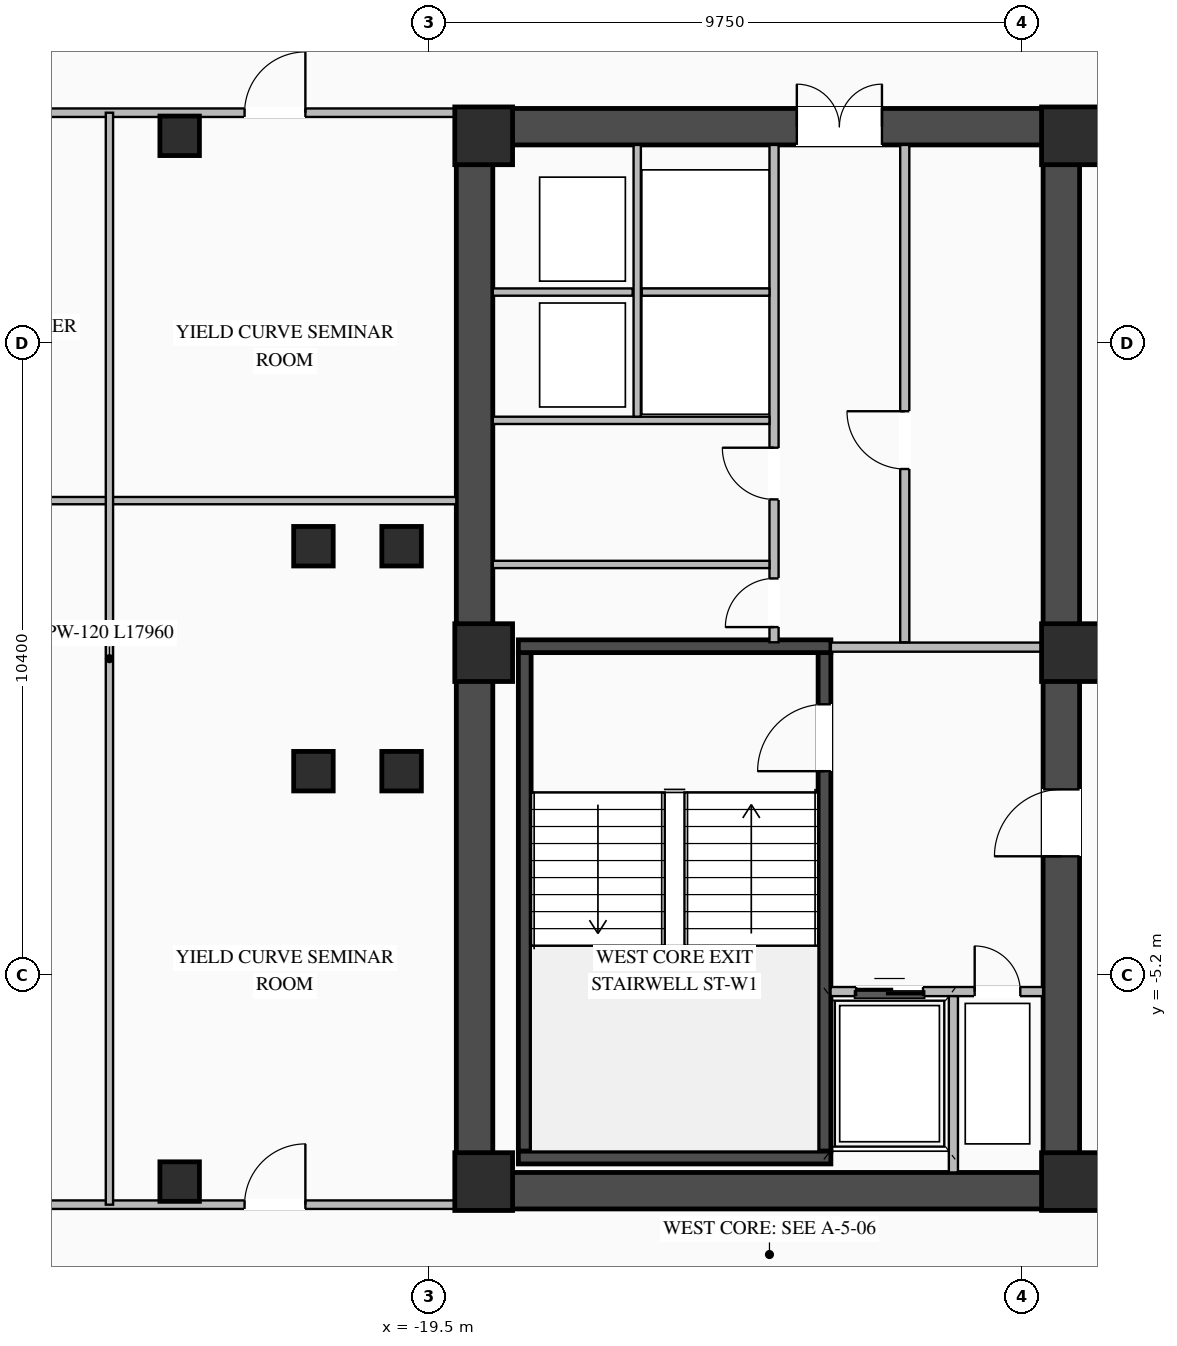
"""IFC4 building model, lengths in metres.
Left out: names, types, materials, properties, quantities, classifications, styles, units other than length and angle.
Written with IfcOpenShell. Run it as: python <this file> out.ifc"""

import sys

from ifc_helpers import new_model, si_unit, direction, frame, frame_2d, origin, origin_2d, place, context, subcontext, project, spatial, rectangle, i_section, extrude, element, fill, save


model = new_model("IFC4")
c1 = context("Model", 3, precision=1e-05, world=origin(), true_north=direction((0.0, 1.0)))
c2 = subcontext(c1, "Body", "Model", "MODEL_VIEW")
j1 = project(units=[si_unit("LENGTHUNIT", "METRE"), si_unit("PLANEANGLEUNIT", "RADIAN")], contexts=[c1])
p1 = place(None, origin())
s1 = spatial("IfcSite", under=j1, at=p1, CompositionType="ELEMENT")
p2 = place(p1, origin())
s2 = spatial("IfcBuilding", under=s1, at=p2, CompositionType="ELEMENT")
p3 = place(p2, frame((0.0, 0.0, 148.45)))
s3 = spatial("IfcBuildingStorey", under=s2, at=p3, CompositionType="ELEMENT", Elevation=148.45)
p4 = place(p3, frame((-19.05, -8.75, 0.0), z_axis=(0.0, 0.0, 1.0), x_axis=(1.0, 0.0, 0.0)))
e1 = element("IfcWall", 1, at=p4, inside=s3, PredefinedType="SHEAR", context=c2, shape_type="SweptSolid", body=[
    extrude(rectangle(XDim=10.25, YDim=0.6, at=frame_2d((5.125, 0.0))), origin(), (0.0, 0.0, 1.0), 3.27),
])
p5 = place(p3, frame((-19.05, 8.75, 0.0), z_axis=(0.0, 0.0, 1.0), x_axis=(1.0, 0.0, 0.0)))
e2 = element("IfcWall", 2, at=p5, inside=s3, PredefinedType="SHEAR", context=c2, shape_type="SweptSolid", body=[
    extrude(rectangle(XDim=10.25, YDim=0.6, at=frame_2d((5.125, 0.0))), origin(), (0.0, 0.0, 1.0), 3.27),
])
p6 = place(p5, frame((5.6, 0.0, 0.0)))
e3 = element("IfcOpeningElement", 3, at=p6, cuts=e2, PredefinedType="OPENING", context=c2, shape_type="SweptSolid", body=[
    extrude(rectangle(XDim=1.4, YDim=2.05, at=frame_2d((0.7, 1.025))), frame((0.0, 0.31, 0.0), z_axis=(0.0, -1.0, 0.0), x_axis=(1.0, 0.0, 0.0)), (0.0, 0.0, 1.0), 0.62),
])
p7 = place(p3, frame((-18.75, -8.45, 0.0), z_axis=(0.0, 0.0, 1.0), x_axis=(0.0, 1.0, 0.0)))
e4 = element("IfcWall", 4, at=p7, inside=s3, PredefinedType="SHEAR", context=c2, shape_type="SweptSolid", body=[
    extrude(rectangle(XDim=16.9, YDim=0.6, at=frame_2d((8.45, 0.0))), origin(), (0.0, 0.0, 1.0), 3.27),
])
p8 = place(p3, frame((-9.1, -8.45, 0.0), z_axis=(0.0, 0.0, 1.0), x_axis=(0.0, 1.0, 0.0)))
e5 = element("IfcWall", 5, at=p8, inside=s3, PredefinedType="SHEAR", context=c2, shape_type="SweptSolid", body=[
    extrude(rectangle(XDim=16.9, YDim=0.6, at=frame_2d((8.45, 0.0))), origin(), (0.0, 0.0, 1.0), 3.27),
])
p9 = place(p8, frame((5.2, 0.0, 0.0)))
e6 = element("IfcOpeningElement", 6, at=p9, cuts=e5, PredefinedType="OPENING", context=c2, shape_type="SweptSolid", body=[
    extrude(rectangle(XDim=1.1, YDim=2.08, at=frame_2d((0.55, 1.04))), frame((0.0, 0.31, 0.0), z_axis=(0.0, -1.0, 0.0), x_axis=(1.0, 0.0, 0.0)), (0.0, 0.0, 1.0), 0.62),
])
p10 = place(p3, frame((-12.995, -8.1, 0.0), z_axis=(0.0, 0.0, 1.0), x_axis=(0.0, 1.0, 0.0)))
e7 = element("IfcWall", 7, at=p10, inside=s3, PredefinedType="SHEAR", context=c2, shape_type="SweptSolid", body=[
    extrude(rectangle(XDim=8.2, YDim=0.21, at=frame_2d((4.1, 0.0))), origin(), (0.0, 0.0, 1.0), 3.27),
])
p11 = place(p10, frame((6.25, 0.0, 0.0)))
e8 = element("IfcOpeningElement", 8, at=p11, cuts=e7, PredefinedType="OPENING", context=c2, shape_type="SweptSolid", body=[
    extrude(rectangle(XDim=1.1, YDim=2.15, at=frame_2d((0.55, 1.075))), frame((0.0, 0.115, 0.0), z_axis=(0.0, -1.0, 0.0), x_axis=(1.0, 0.0, 0.0)), (0.0, 0.0, 1.0), 0.23),
])
p12 = place(p3, frame((-17.925, -8.1, 0.0), z_axis=(0.0, 0.0, 1.0), x_axis=(0.0, 1.0, 0.0)))
e9 = element("IfcWall", 9, at=p12, inside=s3, PredefinedType="SHEAR", context=c2, shape_type="SweptSolid", body=[
    extrude(rectangle(XDim=8.2, YDim=0.21, at=frame_2d((4.1, 0.0))), origin(), (0.0, 0.0, 1.0), 3.27),
])
for number, where, z_axis, x_axis in (
    (10, (-18.03, -8.205, 0.0), (0.0, 0.0, 1.0), (1.0, 0.0, 0.0)),
    (11, (-12.89, 0.205, 0.0), (0.0, 0.0, 1.0), (-1.0, 0.0, 0.0)),
):
    element("IfcWall", number, at=place(p3, frame(where, z_axis=z_axis, x_axis=x_axis)), inside=s3, PredefinedType="SHEAR", context=c2, shape_type="SweptSolid", body=[
        extrude(rectangle(XDim=5.14, YDim=0.21, at=frame_2d((2.57, 0.0))), origin(), (0.0, 0.0, 1.0), 3.27),
    ])
for number, where, z_axis, x_axis in (
    (12, (-8.95, -8.6, 0.0), (0.0, 0.0, 1.0), (1.0, 0.0, 0.0)),
    (13, (-8.95, 0.1, 0.0), (0.0, 0.0, 1.0), (1.0, 0.0, 0.0)),
    (14, (-8.95, 8.6, 0.0), (0.0, 0.0, 1.0), (1.0, 0.0, 0.0)),
    (15, (-18.6, -8.6, 0.0), (0.0, 0.0, 1.0), (1.0, 0.0, 0.0)),
    (16, (-18.6, 0.1, 0.0), (0.0, 0.0, 1.0), (1.0, 0.0, 0.0)),
    (17, (-18.6, 8.6, 0.0), (0.0, 0.0, 1.0), (1.0, 0.0, 0.0)),
):
    element("IfcColumn", number, at=place(p3, frame(where, z_axis=z_axis, x_axis=x_axis)), inside=s3, PredefinedType="COLUMN", context=c2, shape_type="SweptSolid", body=[
        extrude(rectangle(XDim=0.95, YDim=0.95, at=origin_2d()), origin(), (0.0, 0.0, 1.0), 3.45),
    ])
for number, where, z_axis, x_axis in (
    (18, (-21.4, -1.85, 0.0), (0.0, 0.0, 1.0), (1.0, 0.0, 0.0)),
    (19, (-21.4, 1.85, 0.0), (0.0, 0.0, 1.0), (1.0, 0.0, 0.0)),
    (20, (-19.95, -1.85, 0.0), (0.0, 0.0, 1.0), (1.0, 0.0, 0.0)),
    (21, (-19.95, 1.85, 0.0), (0.0, 0.0, 1.0), (1.0, 0.0, 0.0)),
    (22, (-23.6, -8.6, 0.0), (0.0, 0.0, 1.0), (1.0, 0.0, 0.0)),
    (23, (-23.6, 8.6, 0.0), (0.0, 0.0, 1.0), (1.0, 0.0, 0.0)),
):
    element("IfcColumn", number, at=place(p3, frame(where, z_axis=z_axis, x_axis=x_axis)), inside=s3, PredefinedType="COLUMN", context=c2, shape_type="SweptSolid", body=[
        extrude(i_section(OverallWidth=0.65, OverallDepth=0.65, WebThickness=0.028, FlangeThickness=0.04, at=origin_2d()), origin(), (0.0, 0.0, 1.0), 3.45),
    ])
p13 = place(p3, frame((-12.895, -5.475, 0.0), z_axis=(0.0, 0.0, 1.0), x_axis=(1.0, 0.0, 0.0)))
e24 = element("IfcWall", 24, at=p13, inside=s3, PredefinedType="STANDARD", context=c2, shape_type="SweptSolid", body=[
    extrude(rectangle(XDim=3.495, YDim=0.15, at=frame_2d((1.748, 0.0))), origin(), (0.0, 0.0, 1.0), 3.25),
])
p14 = place(p13, frame((0.42, 0.0, 0.0)))
e25 = element("IfcOpeningElement", 25, at=p14, cuts=e24, PredefinedType="OPENING", context=c2, shape_type="SweptSolid", body=[
    extrude(rectangle(XDim=1.1, YDim=2.15, at=frame_2d((0.55, 1.075))), frame((0.0, 0.085, 0.0), z_axis=(0.0, -1.0, 0.0), x_axis=(1.0, 0.0, 0.0)), (0.0, 0.0, 1.0), 0.17),
])
p15 = place(p13, frame((2.37, 0.0, 0.0)))
e26 = element("IfcOpeningElement", 26, at=p15, cuts=e24, PredefinedType="OPENING", context=c2, shape_type="SweptSolid", body=[
    extrude(rectangle(XDim=0.75, YDim=2.05, at=frame_2d((0.375, 1.025))), frame((0.0, 0.085, 0.0), z_axis=(0.0, -1.0, 0.0), x_axis=(1.0, 0.0, 0.0)), (0.0, 0.0, 1.0), 0.17),
])
p16 = place(p3, frame((-10.875, -8.45, 0.0), z_axis=(0.0, 0.0, 1.0), x_axis=(0.0, 1.0, 0.0)))
e27 = element("IfcWall", 27, at=p16, inside=s3, PredefinedType="STANDARD", context=c2, shape_type="SweptSolid", body=[
    extrude(rectangle(XDim=2.9, YDim=0.15, at=frame_2d((1.45, 0.0))), origin(), (0.0, 0.0, 1.0), 3.25),
])
p17 = place(p3, frame((-12.89, 0.19, 0.0), z_axis=(0.0, 0.0, 1.0), x_axis=(1.0, 0.0, 0.0)))
e28 = element("IfcWall", 28, at=p17, inside=s3, PredefinedType="STANDARD", context=c2, shape_type="SweptSolid", body=[
    extrude(rectangle(XDim=3.49, YDim=0.15, at=frame_2d((1.745, 0.0))), origin(), (0.0, 0.0, 1.0), 2.645),
])
p18 = place(p3, frame((-11.675, 0.27, 0.0), z_axis=(0.0, 0.0, 1.0), x_axis=(0.0, 1.0, 0.0)))
e29 = element("IfcWall", 29, at=p18, inside=s3, PredefinedType="STANDARD", context=c2, shape_type="SweptSolid", body=[
    extrude(rectangle(XDim=8.18, YDim=0.15, at=frame_2d((4.09, 0.0))), origin(), (0.0, 0.0, 1.0), 3.25),
])
p19 = place(p18, frame((2.85, 0.0, 0.0)))
e30 = element("IfcOpeningElement", 30, at=p19, cuts=e29, PredefinedType="OPENING", context=c2, shape_type="SweptSolid", body=[
    extrude(rectangle(XDim=0.95, YDim=2.05, at=frame_2d((0.475, 1.025))), frame((0.0, 0.085, 0.0), z_axis=(0.0, -1.0, 0.0), x_axis=(1.0, 0.0, 0.0)), (0.0, 0.0, 1.0), 0.17),
])
p20 = place(p3, frame((-13.825, 0.27, 0.0), z_axis=(0.0, 0.0, 1.0), x_axis=(0.0, 1.0, 0.0)))
e31 = element("IfcWall", 31, at=p20, inside=s3, PredefinedType="STANDARD", context=c2, shape_type="SweptSolid", body=[
    extrude(rectangle(XDim=8.18, YDim=0.15, at=frame_2d((4.09, 0.0))), origin(), (0.0, 0.0, 1.0), 3.25),
])
p21 = place(p20, frame((0.25, 0.0, 0.0)))
e32 = element("IfcOpeningElement", 32, at=p21, cuts=e31, PredefinedType="OPENING", context=c2, shape_type="SweptSolid", body=[
    extrude(rectangle(XDim=0.8, YDim=2.05, at=frame_2d((0.4, 1.025))), frame((0.0, 0.085, 0.0), z_axis=(0.0, -1.0, 0.0), x_axis=(1.0, 0.0, 0.0)), (0.0, 0.0, 1.0), 0.17),
])
p22 = place(p20, frame((2.35, 0.0, 0.0)))
e33 = element("IfcOpeningElement", 33, at=p22, cuts=e31, PredefinedType="OPENING", context=c2, shape_type="SweptSolid", body=[
    extrude(rectangle(XDim=0.85, YDim=2.05, at=frame_2d((0.425, 1.025))), frame((0.0, 0.085, 0.0), z_axis=(0.0, -1.0, 0.0), x_axis=(1.0, 0.0, 0.0)), (0.0, 0.0, 1.0), 0.17),
])
p23 = place(p3, frame((-18.45, 3.92, 0.0), z_axis=(0.0, 0.0, 1.0), x_axis=(1.0, 0.0, 0.0)))
e34 = element("IfcWall", 34, at=p23, inside=s3, PredefinedType="STANDARD", context=c2, shape_type="SweptSolid", body=[
    extrude(rectangle(XDim=4.55, YDim=0.12, at=frame_2d((2.275, 0.0))), origin(), (0.0, 0.0, 1.0), 3.25),
])
p24 = place(p3, frame((-18.45, 6.03, 0.0), z_axis=(0.0, 0.0, 1.0), x_axis=(1.0, 0.0, 0.0)))
e35 = element("IfcWall", 35, at=p24, inside=s3, PredefinedType="STANDARD", context=c2, shape_type="SweptSolid", body=[
    extrude(rectangle(XDim=2.3, YDim=0.12, at=frame_2d((1.15, 0.0))), origin(), (0.0, 0.0, 1.0), 3.25),
])
p25 = place(p3, frame((-16.075, 3.98, 0.0), z_axis=(0.0, 0.0, 1.0), x_axis=(0.0, 1.0, 0.0)))
e36 = element("IfcWall", 36, at=p25, inside=s3, PredefinedType="STANDARD", context=c2, shape_type="SweptSolid", body=[
    extrude(rectangle(XDim=4.47, YDim=0.12, at=frame_2d((2.235, 0.0))), origin(), (0.0, 0.0, 1.0), 3.25),
])
p26 = place(p3, frame((-16.0, 6.03, 0.0), z_axis=(0.0, 0.0, 1.0), x_axis=(1.0, 0.0, 0.0)))
e37 = element("IfcWall", 37, at=p26, inside=s3, PredefinedType="STANDARD", context=c2, shape_type="SweptSolid", body=[
    extrude(rectangle(XDim=2.1, YDim=0.12, at=frame_2d((1.05, 0.0))), origin(), (0.0, 0.0, 1.0), 3.25),
])
p27 = place(p3, frame((-18.45, 1.55, 0.0), z_axis=(0.0, 0.0, 1.0), x_axis=(1.0, 0.0, 0.0)))
e38 = element("IfcWall", 38, at=p27, inside=s3, PredefinedType="STANDARD", context=c2, shape_type="SweptSolid", body=[
    extrude(rectangle(XDim=4.55, YDim=0.12, at=frame_2d((2.275, 0.0))), origin(), (0.0, 0.0, 1.0), 3.25),
])
p28 = place(p3, frame((-32.82, 8.98, 0.0), z_axis=(0.0, 0.0, 1.0), x_axis=(1.0, 0.0, 0.0)))
e39 = element("IfcWall", 39, at=p28, inside=s3, PredefinedType="STANDARD", context=c2, shape_type="SweptSolid", body=[
    extrude(rectangle(XDim=13.77, YDim=0.14, at=frame_2d((6.885, 0.0))), origin(), (0.0, 0.0, 1.0), 3.25),
])
p29 = place(p28, frame((1.183, 0.0, 0.0)))
e40 = element("IfcOpeningElement", 40, at=p29, cuts=e39, PredefinedType="OPENING", context=c2, shape_type="SweptSolid", body=[
    extrude(rectangle(XDim=1.0, YDim=2.08, at=frame_2d((0.5, 1.04))), frame((0.0, 0.08, 0.0), z_axis=(0.0, -1.0, 0.0), x_axis=(1.0, 0.0, 0.0)), (0.0, 0.0, 1.0), 0.16),
])
p30 = place(p28, frame((10.288, 0.0, 0.0)))
e41 = element("IfcOpeningElement", 41, at=p30, cuts=e39, PredefinedType="OPENING", context=c2, shape_type="SweptSolid", body=[
    extrude(rectangle(XDim=1.0, YDim=2.08, at=frame_2d((0.5, 1.04))), frame((0.0, 0.08, 0.0), z_axis=(0.0, -1.0, 0.0), x_axis=(1.0, 0.0, 0.0)), (0.0, 0.0, 1.0), 0.16),
])
p31 = place(p3, frame((-32.82, -8.98, 0.0), z_axis=(0.0, 0.0, 1.0), x_axis=(1.0, 0.0, 0.0)))
e42 = element("IfcWall", 42, at=p31, inside=s3, PredefinedType="STANDARD", context=c2, shape_type="SweptSolid", body=[
    extrude(rectangle(XDim=13.77, YDim=0.14, at=frame_2d((6.885, 0.0))), origin(), (0.0, 0.0, 1.0), 3.25),
])
p32 = place(p31, frame((1.183, 0.0, 0.0)))
e43 = element("IfcOpeningElement", 43, at=p32, cuts=e42, PredefinedType="OPENING", context=c2, shape_type="SweptSolid", body=[
    extrude(rectangle(XDim=1.0, YDim=2.08, at=frame_2d((0.5, 1.04))), frame((0.0, 0.08, 0.0), z_axis=(0.0, -1.0, 0.0), x_axis=(1.0, 0.0, 0.0)), (0.0, 0.0, 1.0), 0.16),
])
p33 = place(p31, frame((10.288, 0.0, 0.0)))
e44 = element("IfcOpeningElement", 44, at=p33, cuts=e42, PredefinedType="OPENING", context=c2, shape_type="SweptSolid", body=[
    extrude(rectangle(XDim=1.0, YDim=2.08, at=frame_2d((0.5, 1.04))), frame((0.0, 0.08, 0.0), z_axis=(0.0, -1.0, 0.0), x_axis=(1.0, 0.0, 0.0)), (0.0, 0.0, 1.0), 0.16),
])
p34 = place(p3, frame((-32.82, 2.6, 0.0), z_axis=(0.0, 0.0, 1.0), x_axis=(1.0, 0.0, 0.0)))
e45 = element("IfcWall", 45, at=p34, inside=s3, PredefinedType="STANDARD", context=c2, shape_type="SweptSolid", body=[
    extrude(rectangle(XDim=13.77, YDim=0.12, at=frame_2d((6.885, 0.0))), origin(), (0.0, 0.0, 1.0), 3.25),
])
p35 = place(p3, frame((-24.755, -8.98, 0.0), z_axis=(0.0, 0.0, 1.0), x_axis=(0.0, 1.0, 0.0)))
e46 = element("IfcWall", 46, at=p35, inside=s3, PredefinedType="STANDARD", context=c2, shape_type="SweptSolid", body=[
    extrude(rectangle(XDim=17.96, YDim=0.12, at=frame_2d((8.98, 0.0))), origin(), (0.0, 0.0, 1.0), 3.25),
])
p36 = place(p11, origin())
e47 = element("IfcDoor", 47, at=p36, inside=s3, OperationType="SINGLE_SWING_LEFT", PredefinedType="DOOR", context=c2, shape_type="SweptSolid", body=[
    extrude(rectangle(XDim=1.1, YDim=2.15, at=frame_2d((0.55, 1.075))), frame((0.0, 0.025, 0.0), z_axis=(0.0, -1.0, 0.0), x_axis=(1.0, 0.0, 0.0)), (0.0, 0.0, 1.0), 0.05),
])
fill(e8, e47)
p37 = place(p14, origin())
e48 = element("IfcDoor", 48, at=p37, inside=s3, OperationType="DOUBLE_DOOR_SLIDING", PredefinedType="DOOR", context=c2, shape_type="SweptSolid", body=[
    extrude(rectangle(XDim=1.1, YDim=2.15, at=frame_2d((0.55, 1.075))), frame((0.0, 0.025, 0.0), z_axis=(0.0, -1.0, 0.0), x_axis=(1.0, 0.0, 0.0)), (0.0, 0.0, 1.0), 0.05),
])
fill(e25, e48)
p38 = place(p15, origin())
e49 = element("IfcDoor", 49, at=p38, inside=s3, OperationType="SINGLE_SWING_LEFT", PredefinedType="DOOR", context=c2, shape_type="SweptSolid", body=[
    extrude(rectangle(XDim=0.75, YDim=2.05, at=frame_2d((0.375, 1.025))), frame((0.0, 0.025, 0.0), z_axis=(0.0, -1.0, 0.0), x_axis=(1.0, 0.0, 0.0)), (0.0, 0.0, 1.0), 0.05),
])
fill(e26, e49)
p39 = place(p9, origin())
e50 = element("IfcDoor", 50, at=p39, inside=s3, OperationType="SINGLE_SWING_LEFT", PredefinedType="DOOR", context=c2, shape_type="SweptSolid", body=[
    extrude(rectangle(XDim=1.1, YDim=2.08, at=frame_2d((0.55, 1.04))), frame((0.0, 0.255, 0.0), z_axis=(0.0, -1.0, 0.0), x_axis=(1.0, 0.0, 0.0)), (0.0, 0.0, 1.0), 0.05),
])
fill(e6, e50)
p40 = place(p6, origin())
e51 = element("IfcDoor", 51, at=p40, inside=s3, OperationType="DOUBLE_DOOR_SINGLE_SWING", PredefinedType="DOOR", context=c2, shape_type="SweptSolid", body=[
    extrude(rectangle(XDim=1.4, YDim=2.05, at=frame_2d((0.7, 1.025))), frame((0.0, 0.245, 0.0), z_axis=(0.0, -1.0, 0.0), x_axis=(1.0, 0.0, 0.0)), (0.0, 0.0, 1.0), 0.05),
])
fill(e3, e51)
p41 = place(p19, origin())
e52 = element("IfcDoor", 52, at=p41, inside=s3, OperationType="SINGLE_SWING_RIGHT", PredefinedType="DOOR", context=c2, shape_type="SweptSolid", body=[
    extrude(rectangle(XDim=0.95, YDim=2.05, at=frame_2d((0.475, 1.025))), frame((0.0, 0.025, 0.0), z_axis=(0.0, -1.0, 0.0), x_axis=(1.0, 0.0, 0.0)), (0.0, 0.0, 1.0), 0.05),
])
fill(e30, e52)
p42 = place(p21, origin())
e53 = element("IfcDoor", 53, at=p42, inside=s3, OperationType="SINGLE_SWING_LEFT", PredefinedType="DOOR", context=c2, shape_type="SweptSolid", body=[
    extrude(rectangle(XDim=0.8, YDim=2.05, at=frame_2d((0.4, 1.025))), frame((0.0, 0.025, 0.0), z_axis=(0.0, -1.0, 0.0), x_axis=(1.0, 0.0, 0.0)), (0.0, 0.0, 1.0), 0.05),
])
fill(e32, e53)
p43 = place(p22, origin())
e54 = element("IfcDoor", 54, at=p43, inside=s3, OperationType="SINGLE_SWING_RIGHT", PredefinedType="DOOR", context=c2, shape_type="SweptSolid", body=[
    extrude(rectangle(XDim=0.85, YDim=2.05, at=frame_2d((0.425, 1.025))), frame((0.0, 0.025, 0.0), z_axis=(0.0, -1.0, 0.0), x_axis=(1.0, 0.0, 0.0)), (0.0, 0.0, 1.0), 0.05),
])
fill(e33, e54)
p44 = place(p30, origin())
e55 = element("IfcDoor", 55, at=p44, inside=s3, OperationType="SINGLE_SWING_RIGHT", PredefinedType="DOOR", context=c2, shape_type="SweptSolid", body=[
    extrude(rectangle(XDim=1.0, YDim=2.08, at=frame_2d((0.5, 1.04))), frame((0.0, 0.025, 0.0), z_axis=(0.0, -1.0, 0.0), x_axis=(1.0, 0.0, 0.0)), (0.0, 0.0, 1.0), 0.05),
])
fill(e41, e55)
p45 = place(p33, origin())
e56 = element("IfcDoor", 56, at=p45, inside=s3, OperationType="SINGLE_SWING_RIGHT", PredefinedType="DOOR", context=c2, shape_type="SweptSolid", body=[
    extrude(rectangle(XDim=1.0, YDim=2.08, at=frame_2d((0.5, 1.04))), frame((0.0, 0.025, 0.0), z_axis=(0.0, -1.0, 0.0), x_axis=(1.0, 0.0, 0.0)), (0.0, 0.0, 1.0), 0.05),
])
fill(e44, e56)
save(model, sys.argv[1])
